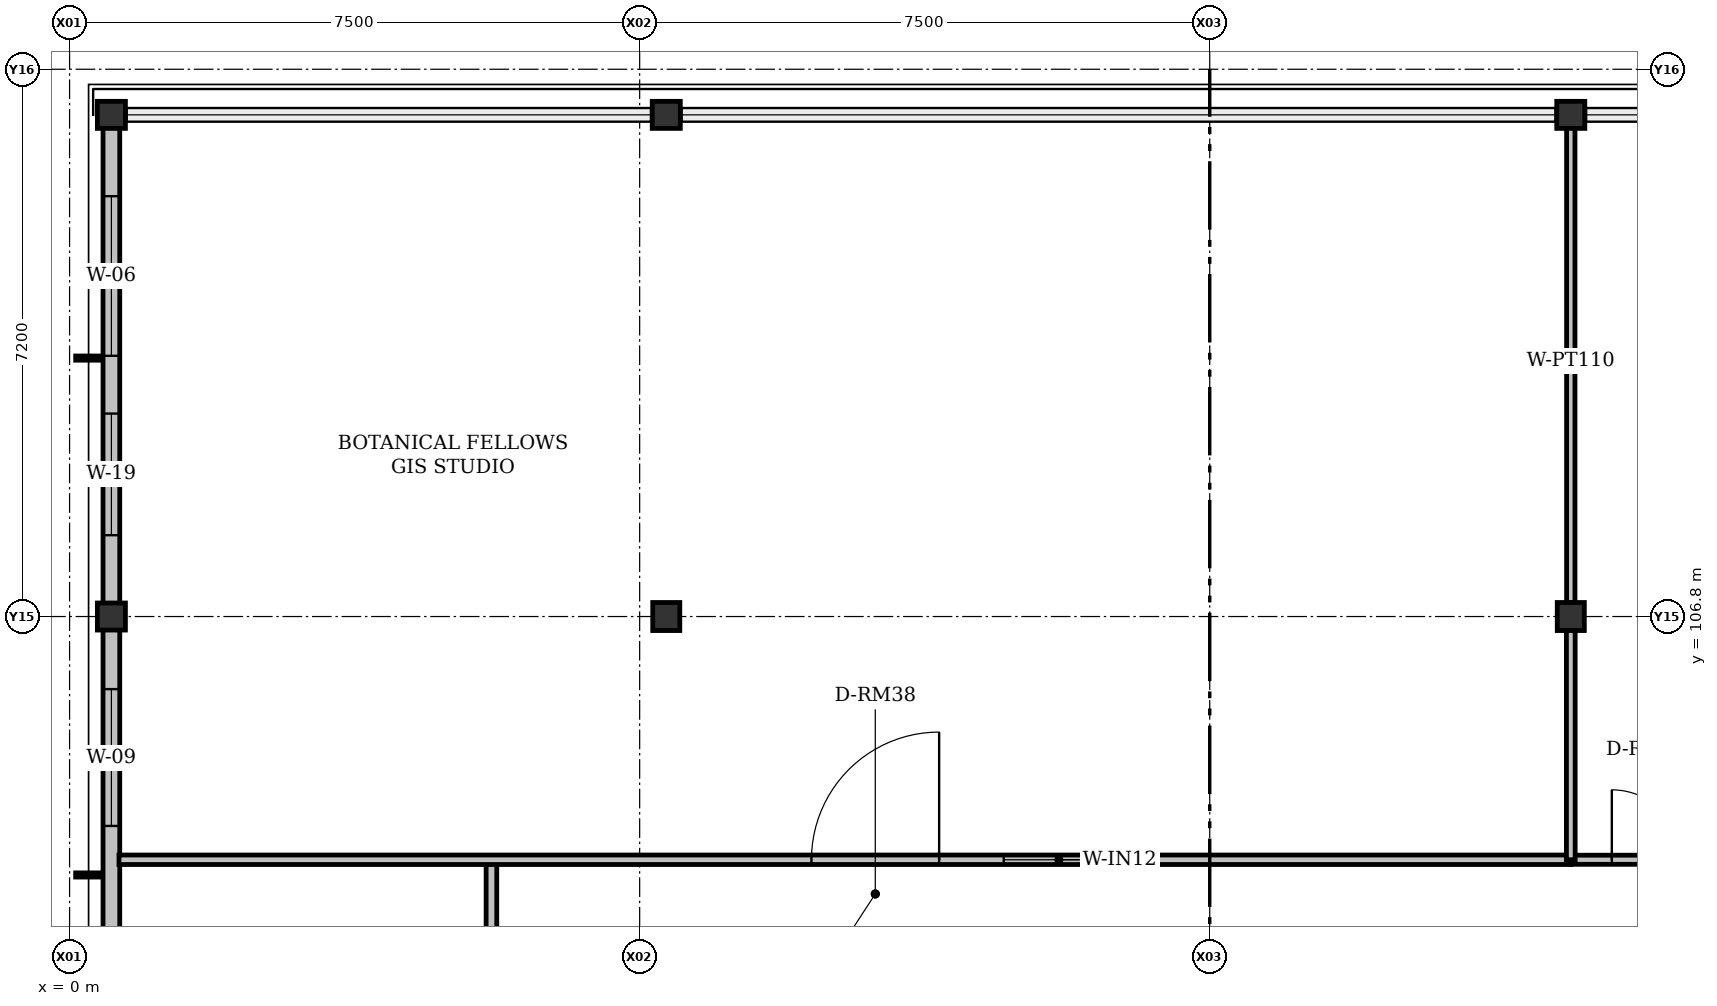
"""IFC4 building model, lengths in metres.
Left out: names, types, materials, properties, quantities, classifications, styles, units other than length and angle.
Written with IfcOpenShell. Run it as: python <this file> out.ifc"""

import sys

from ifc_helpers import new_model, si_unit, direction, frame, frame_2d, origin, origin_2d, place, context, subcontext, project, spatial, rectangle, i_section, extrude, element, fill, save


model = new_model("IFC4")
c1 = context("Model", 3, precision=1e-05, world=origin(), true_north=direction((0.0, 1.0)))
c2 = subcontext(c1, "Body", "Model", "MODEL_VIEW")
j1 = project(units=[si_unit("LENGTHUNIT", "METRE"), si_unit("PLANEANGLEUNIT", "RADIAN")], contexts=[c1])
p1 = place(None, origin())
s1 = spatial("IfcSite", under=j1, at=p1, CompositionType="ELEMENT")
p2 = place(p1, origin())
s2 = spatial("IfcBuilding", under=s1, at=p2, CompositionType="ELEMENT")
p3 = place(p2, frame((0.0, 0.0, 56.1)))
s3 = spatial("IfcBuildingStorey", under=s2, at=p3, CompositionType="ELEMENT", Elevation=56.1)
for number, where, z_axis, x_axis in (
    (1, (0.55, 106.8, 0.0), (0.0, 0.0, 1.0), (1.0, 0.0, 0.0)),
    (2, (7.85, 106.8, 0.0), (0.0, 0.0, 1.0), (0.0, 1.0, 0.0)),
    (3, (19.75, 106.8, 0.0), (0.0, 0.0, 1.0), (0.0, 1.0, 0.0)),
    (4, (0.55, 113.4, 0.0), (0.0, 0.0, 1.0), (1.0, 0.0, 0.0)),
    (5, (7.85, 113.4, 0.0), (0.0, 0.0, 1.0), (1.0, 0.0, 0.0)),
    (6, (19.75, 113.4, 0.0), (0.0, 0.0, 1.0), (1.0, 0.0, 0.0)),
):
    element("IfcColumn", number, at=place(p3, frame(where, z_axis=z_axis, x_axis=x_axis)), inside=s3, PredefinedType="COLUMN", context=c2, shape_type="SweptSolid", body=[
        extrude(i_section(OverallWidth=0.369, OverallDepth=0.356, WebThickness=0.011, FlangeThickness=0.018, FilletRadius=0.015, at=origin_2d()), origin(), (0.0, 0.0, 1.0), 4.2),
    ])
p4 = place(p3, frame((0.55, 99.6, 0.0), z_axis=(0.0, 0.0, 1.0), x_axis=(0.0, 1.0, 0.0)))
e7 = element("IfcWall", 7, at=p4, inside=s3, PredefinedType="SOLIDWALL", context=c2, shape_type="SweptSolid", body=[
    extrude(rectangle(XDim=7.2, YDim=0.22, at=frame_2d((3.6, 0.0))), origin(), (0.0, 0.0, 1.0), 3.562),
])
p5 = place(p4, frame((1.73, 0.0, 0.92)))
e8 = element("IfcOpeningElement", 8, at=p5, cuts=e7, PredefinedType="OPENING", context=c2, shape_type="SweptSolid", body=[
    extrude(rectangle(XDim=1.05, YDim=1.3, at=frame_2d((0.525, 0.65))), frame((0.0, 0.11, 0.0), z_axis=(0.0, -1.0, 0.0), x_axis=(1.0, 0.0, 0.0)), (0.0, 0.0, 1.0), 0.22),
])
p6 = place(p4, frame((4.445, 0.0, 0.92)))
e9 = element("IfcOpeningElement", 9, at=p6, cuts=e7, PredefinedType="OPENING", context=c2, shape_type="SweptSolid", body=[
    extrude(rectangle(XDim=1.8, YDim=1.55, at=frame_2d((0.9, 0.775))), frame((0.0, 0.11, 0.0), z_axis=(0.0, -1.0, 0.0), x_axis=(1.0, 0.0, 0.0)), (0.0, 0.0, 1.0), 0.22),
])
p7 = place(p3, frame((0.55, 106.8, 0.0), z_axis=(0.0, 0.0, 1.0), x_axis=(0.0, 1.0, 0.0)))
e10 = element("IfcWall", 10, at=p7, inside=s3, PredefinedType="SOLIDWALL", context=c2, shape_type="SweptSolid", body=[
    extrude(rectangle(XDim=6.6, YDim=0.22, at=frame_2d((3.3, 0.0))), origin(), (0.0, 0.0, 1.0), 3.562),
])
p8 = place(p7, frame((1.07, 0.0, 0.92)))
e11 = element("IfcOpeningElement", 11, at=p8, cuts=e10, PredefinedType="OPENING", context=c2, shape_type="SweptSolid", body=[
    extrude(rectangle(XDim=1.6, YDim=1.35, at=frame_2d((0.8, 0.675))), frame((0.0, 0.11, 0.0), z_axis=(0.0, -1.0, 0.0), x_axis=(1.0, 0.0, 0.0)), (0.0, 0.0, 1.0), 0.22),
])
p9 = place(p7, frame((3.43, 0.0, 0.92)))
e12 = element("IfcOpeningElement", 12, at=p9, cuts=e10, PredefinedType="OPENING", context=c2, shape_type="SweptSolid", body=[
    extrude(rectangle(XDim=2.1, YDim=1.4, at=frame_2d((1.05, 0.7))), frame((0.0, 0.11, 0.0), z_axis=(0.0, -1.0, 0.0), x_axis=(1.0, 0.0, 0.0)), (0.0, 0.0, 1.0), 0.22),
])
p10 = place(p3, frame((5.55, 92.4, 0.0), z_axis=(0.0, 0.0, 1.0), x_axis=(0.0, 1.0, 0.0)))
e13 = element("IfcWall", 13, at=p10, inside=s3, PredefinedType="PARTITIONING", context=c2, shape_type="SweptSolid", body=[
    extrude(rectangle(XDim=11.2, YDim=0.14, at=frame_2d((5.6, 0.0))), origin(), (0.0, 0.0, 1.0), 3.436),
])
p11 = place(p10, frame((4.86, 0.0, 0.0)))
e14 = element("IfcOpeningElement", 14, at=p11, cuts=e13, PredefinedType="OPENING", context=c2, shape_type="SweptSolid", body=[
    extrude(rectangle(XDim=1.48, YDim=2.28, at=frame_2d((0.74, 1.14))), frame((0.0, 0.07, 0.0), z_axis=(0.0, -1.0, 0.0), x_axis=(1.0, 0.0, 0.0)), (0.0, 0.0, 1.0), 0.14),
])
p12 = place(p10, frame((7.19, 0.0, 0.92)))
e15 = element("IfcOpeningElement", 15, at=p12, cuts=e13, PredefinedType="OPENING", context=c2, shape_type="SweptSolid", body=[
    extrude(rectangle(XDim=1.3, YDim=1.3, at=frame_2d((0.65, 0.65))), frame((0.0, 0.07, 0.0), z_axis=(0.0, -1.0, 0.0), x_axis=(1.0, 0.0, 0.0)), (0.0, 0.0, 1.0), 0.14),
])
p13 = place(p3, frame((0.65, 103.6, 0.0), z_axis=(0.0, 0.0, 1.0), x_axis=(1.0, 0.0, 0.0)))
e16 = element("IfcWall", 16, at=p13, inside=s3, PredefinedType="PARTITIONING", context=c2, shape_type="SweptSolid", body=[
    extrude(rectangle(XDim=19.1, YDim=0.125, at=frame_2d((9.55, 0.0))), origin(), (0.0, 0.0, 1.0), 3.512),
])
p14 = place(p13, frame((9.11, 0.0, 0.0)))
e17 = element("IfcOpeningElement", 17, at=p14, cuts=e16, PredefinedType="OPENING", context=c2, shape_type="SweptSolid", body=[
    extrude(rectangle(XDim=1.68, YDim=2.35, at=frame_2d((0.84, 1.175))), frame((0.0, 0.062, 0.0), z_axis=(0.0, -1.0, 0.0), x_axis=(1.0, 0.0, 0.0)), (0.0, 0.0, 1.0), 0.125),
])
p15 = place(p13, frame((11.64, 0.0, 0.92)))
e18 = element("IfcOpeningElement", 18, at=p15, cuts=e16, PredefinedType="OPENING", context=c2, shape_type="SweptSolid", body=[
    extrude(rectangle(XDim=1.45, YDim=1.3, at=frame_2d((0.725, 0.65))), frame((0.0, 0.062, 0.0), z_axis=(0.0, -1.0, 0.0), x_axis=(1.0, 0.0, 0.0)), (0.0, 0.0, 1.0), 0.125),
])
p16 = place(p3, frame((19.75, 103.6, 0.0), z_axis=(0.0, 0.0, 1.0), x_axis=(1.0, 0.0, 0.0)))
e19 = element("IfcWall", 19, at=p16, inside=s3, PredefinedType="PARTITIONING", context=c2, shape_type="SweptSolid", body=[
    extrude(rectangle(XDim=5.04, YDim=0.12, at=frame_2d((2.52, 0.0))), origin(), (0.0, 0.0, 1.0), 3.512),
])
p17 = place(p16, frame((0.54, 0.0, 0.0)))
e20 = element("IfcOpeningElement", 20, at=p17, cuts=e19, PredefinedType="OPENING", context=c2, shape_type="SweptSolid", body=[
    extrude(rectangle(XDim=0.92, YDim=2.1, at=frame_2d((0.46, 1.05))), frame((0.0, 0.06, 0.0), z_axis=(0.0, -1.0, 0.0), x_axis=(1.0, 0.0, 0.0)), (0.0, 0.0, 1.0), 0.12),
])
p18 = place(p3, frame((19.75, 106.621, 0.0), z_axis=(0.0, 0.0, 1.0), x_axis=(0.0, -1.0, 0.0)))
e21 = element("IfcWall", 21, at=p18, inside=s3, PredefinedType="PARTITIONING", context=c2, shape_type="SweptSolid", body=[
    extrude(rectangle(XDim=3.021, YDim=0.115, at=frame_2d((1.51, 0.0))), origin(), (0.0, 0.0, 1.0), 3.512),
])
p19 = place(p3, frame((19.75, 113.35, 0.0), z_axis=(0.0, 0.0, 1.0), x_axis=(0.0, -1.0, 0.0)))
e22 = element("IfcWall", 22, at=p19, inside=s3, PredefinedType="PARTITIONING", context=c2, shape_type="SweptSolid", body=[
    extrude(rectangle(XDim=6.371, YDim=0.11, at=frame_2d((3.185, 0.0))), origin(), (0.0, 0.0, 1.0), 3.512),
])
p20 = place(p6, origin())
e23 = element("IfcWindow", 23, at=p20, inside=s3, PartitioningType="DOUBLE_PANEL_VERTICAL", PredefinedType="WINDOW", context=c2, shape_type="SweptSolid", body=[
    extrude(rectangle(XDim=1.8, YDim=1.55, at=frame_2d((0.9, 0.775))), frame((0.0, 0.03, 0.0), z_axis=(0.0, -1.0, 0.0), x_axis=(1.0, 0.0, 0.0)), (0.0, 0.0, 1.0), 0.06),
])
fill(e9, e23)
p21 = place(p8, origin())
e24 = element("IfcWindow", 24, at=p21, inside=s3, PartitioningType="DOUBLE_PANEL_VERTICAL", PredefinedType="WINDOW", context=c2, shape_type="SweptSolid", body=[
    extrude(rectangle(XDim=1.6, YDim=1.35, at=frame_2d((0.8, 0.675))), frame((0.0, 0.03, 0.0), z_axis=(0.0, -1.0, 0.0), x_axis=(1.0, 0.0, 0.0)), (0.0, 0.0, 1.0), 0.06),
])
fill(e11, e24)
p22 = place(p9, origin())
e25 = element("IfcWindow", 25, at=p22, inside=s3, PartitioningType="DOUBLE_PANEL_VERTICAL", PredefinedType="WINDOW", context=c2, shape_type="SweptSolid", body=[
    extrude(rectangle(XDim=2.1, YDim=1.4, at=frame_2d((1.05, 0.7))), frame((0.0, 0.03, 0.0), z_axis=(0.0, -1.0, 0.0), x_axis=(1.0, 0.0, 0.0)), (0.0, 0.0, 1.0), 0.06),
])
fill(e12, e25)
p23 = place(p14, origin())
e26 = element("IfcDoor", 26, at=p23, inside=s3, OperationType="SINGLE_SWING_RIGHT", PredefinedType="DOOR", context=c2, shape_type="SweptSolid", body=[
    extrude(rectangle(XDim=1.68, YDim=2.35, at=frame_2d((0.84, 1.175))), frame((0.0, 0.025, 0.0), z_axis=(0.0, -1.0, 0.0), x_axis=(1.0, 0.0, 0.0)), (0.0, 0.0, 1.0), 0.05),
])
fill(e17, e26)
p24 = place(p15, origin())
e27 = element("IfcWindow", 27, at=p24, inside=s3, PartitioningType="SINGLE_PANEL", PredefinedType="WINDOW", context=c2, shape_type="SweptSolid", body=[
    extrude(rectangle(XDim=1.45, YDim=1.3, at=frame_2d((0.725, 0.65))), frame((0.0, 0.03, 0.0), z_axis=(0.0, -1.0, 0.0), x_axis=(1.0, 0.0, 0.0)), (0.0, 0.0, 1.0), 0.06),
])
fill(e18, e27)
p25 = place(p17, origin())
e28 = element("IfcDoor", 28, at=p25, inside=s3, OperationType="SINGLE_SWING_LEFT", PredefinedType="DOOR", context=c2, shape_type="SweptSolid", body=[
    extrude(rectangle(XDim=0.92, YDim=2.1, at=frame_2d((0.46, 1.05))), frame((0.0, 0.025, 0.0), z_axis=(0.0, -1.0, 0.0), x_axis=(1.0, 0.0, 0.0)), (0.0, 0.0, 1.0), 0.05),
])
fill(e20, e28)
save(model, sys.argv[1])
